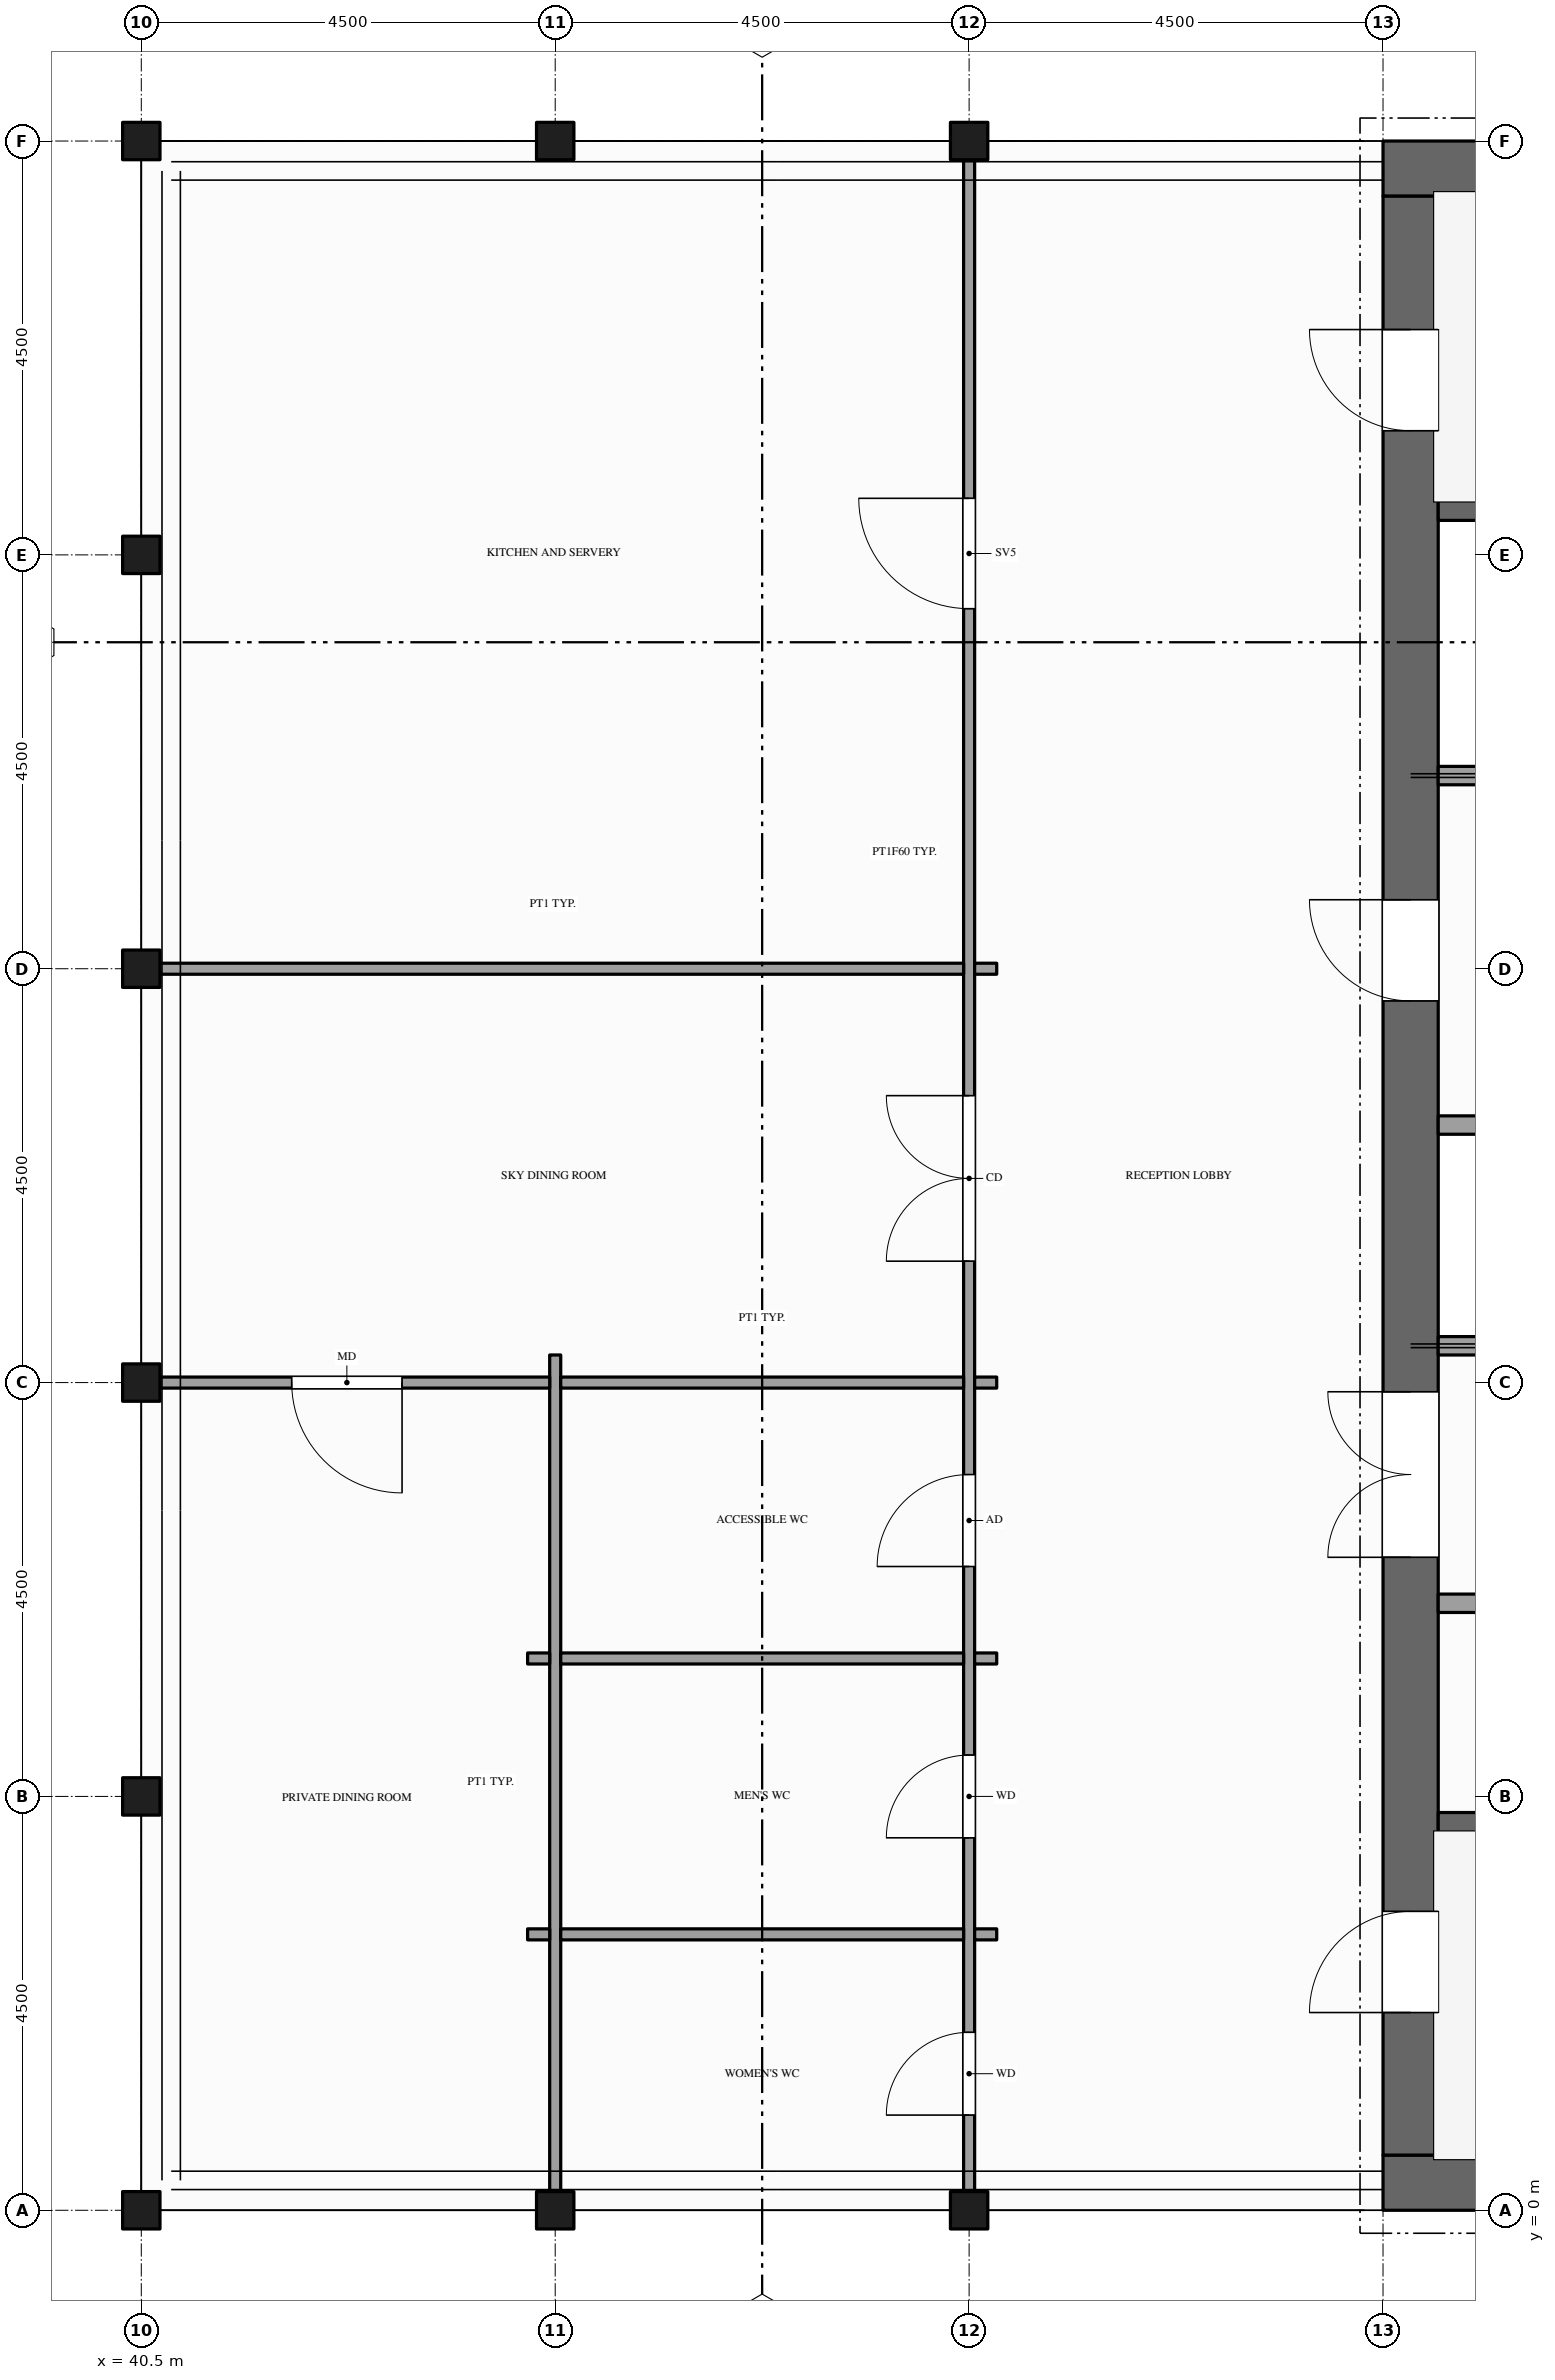
"""IFC4 building model, lengths in metres.
Left out: names, types, materials, properties, quantities, classifications, styles, units other than length and angle.
Written with IfcOpenShell. Run it as: python <this file> out.ifc"""

import sys

from ifc_helpers import new_model, si_unit, direction, frame, frame_2d, origin, place, context, subcontext, project, spatial, rectangle, extrude, element, fill, save


model = new_model("IFC4")
c1 = context("Model", 3, precision=1e-05, world=origin(), true_north=direction((0.0, 1.0)))
c2 = subcontext(c1, "Body", "Model", "MODEL_VIEW")
j1 = project(units=[si_unit("LENGTHUNIT", "METRE"), si_unit("PLANEANGLEUNIT", "RADIAN")], contexts=[c1])
p1 = place(None, origin())
s1 = spatial("IfcSite", under=j1, at=p1, CompositionType="ELEMENT")
p2 = place(p1, origin())
s2 = spatial("IfcBuilding", under=s1, at=p2, CompositionType="ELEMENT")
p3 = place(p2, frame((0.0, 0.0, 350.5)))
s3 = spatial("IfcBuildingStorey", under=s2, at=p3, CompositionType="ELEMENT", Elevation=350.5)
for number, where, z_axis, x_axis in (
    (1, (67.5, 0.3, -0.15), (0.0, 0.0, 1.0), (-1.0, 0.0, 0.0)),
    (2, (54.0, 22.2, -0.15), (0.0, 0.0, 1.0), (1.0, 0.0, 0.0)),
):
    element("IfcWall", number, at=place(p3, frame(where, z_axis=z_axis, x_axis=x_axis)), inside=s3, PredefinedType="SHEAR", context=c2, shape_type="SweptSolid", body=[
        extrude(rectangle(XDim=13.5, YDim=0.6, at=frame_2d((6.75, 0.0))), origin(), (0.0, 0.0, 1.0), 5.0),
    ])
p4 = place(p3, frame((54.3, 0.6, -0.15), z_axis=(0.0, 0.0, 1.0), x_axis=(0.0, 1.0, 0.0)))
e3 = element("IfcWall", 3, at=p4, inside=s3, PredefinedType="SHEAR", context=c2, shape_type="SweptSolid", body=[
    extrude(rectangle(XDim=21.3, YDim=0.6, at=frame_2d((10.65, 0.0))), origin(), (0.0, 0.0, 1.0), 5.0),
])
p5 = place(p4, frame((6.5, 0.0, 0.15)))
e4 = element("IfcOpeningElement", 4, at=p5, cuts=e3, PredefinedType="OPENING", context=c2, shape_type="SweptSolid", body=[
    extrude(rectangle(XDim=1.8, YDim=2.1, at=frame_2d((0.9, 1.05))), frame((0.0, 0.31, 0.0), z_axis=(0.0, -1.0, 0.0), x_axis=(1.0, 0.0, 0.0)), (0.0, 0.0, 1.0), 0.62),
])
p6 = place(p4, frame((12.55, 0.0, 0.15)))
e5 = element("IfcOpeningElement", 5, at=p6, cuts=e3, PredefinedType="OPENING", context=c2, shape_type="SweptSolid", body=[
    extrude(rectangle(XDim=1.1, YDim=2.1, at=frame_2d((0.55, 1.05))), frame((0.0, 0.31, 0.0), z_axis=(0.0, -1.0, 0.0), x_axis=(1.0, 0.0, 0.0)), (0.0, 0.0, 1.0), 0.62),
])
p7 = place(p4, frame((1.55, 0.0, 0.15)))
e6 = element("IfcOpeningElement", 6, at=p7, cuts=e3, PredefinedType="OPENING", context=c2, shape_type="SweptSolid", body=[
    extrude(rectangle(XDim=1.1, YDim=2.1, at=frame_2d((0.55, 1.05))), frame((0.0, 0.31, 0.0), z_axis=(0.0, -1.0, 0.0), x_axis=(1.0, 0.0, 0.0)), (0.0, 0.0, 1.0), 0.62),
])
p8 = place(p4, frame((18.75, 0.0, 0.15)))
e7 = element("IfcOpeningElement", 7, at=p8, cuts=e3, PredefinedType="OPENING", context=c2, shape_type="SweptSolid", body=[
    extrude(rectangle(XDim=1.1, YDim=2.1, at=frame_2d((0.55, 1.05))), frame((0.0, 0.31, 0.0), z_axis=(0.0, -1.0, 0.0), x_axis=(1.0, 0.0, 0.0)), (0.0, 0.0, 1.0), 0.62),
])
p9 = place(p3, frame((45.0, 0.01, 0.0), z_axis=(0.0, 0.0, 1.0), x_axis=(0.0, 1.0, 0.0)))
e8 = element("IfcWall", 8, at=p9, inside=s3, PredefinedType="PARTITIONING", context=c2, shape_type="SweptSolid", body=[
    extrude(rectangle(XDim=9.29, YDim=0.12, at=frame_2d((4.645, 0.0))), origin(), (0.0, 0.0, 1.0), 3.759),
])
p10 = place(p3, frame((49.5, 0.01, 0.0), z_axis=(0.0, 0.0, 1.0), x_axis=(0.0, 1.0, 0.0)))
e9 = element("IfcWall", 9, at=p10, inside=s3, PredefinedType="PARTITIONING", context=c2, shape_type="SweptSolid", body=[
    extrude(rectangle(XDim=22.48, YDim=0.12, at=frame_2d((11.24, 0.0))), origin(), (0.0, 0.0, 1.0), 3.759),
])
p11 = place(p10, frame((1.025, 0.0, 0.0)))
e10 = element("IfcOpeningElement", 10, at=p11, cuts=e9, PredefinedType="OPENING", context=c2, shape_type="SweptSolid", body=[
    extrude(rectangle(XDim=0.9, YDim=2.1, at=frame_2d((0.45, 1.05))), frame((0.0, 0.07, 0.0), z_axis=(0.0, -1.0, 0.0), x_axis=(1.0, 0.0, 0.0)), (0.0, 0.0, 1.0), 0.14),
])
p12 = place(p10, frame((4.04, 0.0, 0.0)))
e11 = element("IfcOpeningElement", 11, at=p12, cuts=e9, PredefinedType="OPENING", context=c2, shape_type="SweptSolid", body=[
    extrude(rectangle(XDim=0.9, YDim=2.1, at=frame_2d((0.45, 1.05))), frame((0.0, 0.07, 0.0), z_axis=(0.0, -1.0, 0.0), x_axis=(1.0, 0.0, 0.0)), (0.0, 0.0, 1.0), 0.14),
])
p13 = place(p10, frame((6.99, 0.0, 0.0)))
e12 = element("IfcOpeningElement", 12, at=p13, cuts=e9, PredefinedType="OPENING", context=c2, shape_type="SweptSolid", body=[
    extrude(rectangle(XDim=1.0, YDim=2.1, at=frame_2d((0.5, 1.05))), frame((0.0, 0.07, 0.0), z_axis=(0.0, -1.0, 0.0), x_axis=(1.0, 0.0, 0.0)), (0.0, 0.0, 1.0), 0.14),
])
p14 = place(p10, frame((10.31, 0.0, 0.0)))
e13 = element("IfcOpeningElement", 13, at=p14, cuts=e9, PredefinedType="OPENING", context=c2, shape_type="SweptSolid", body=[
    extrude(rectangle(XDim=1.8, YDim=2.1, at=frame_2d((0.9, 1.05))), frame((0.0, 0.07, 0.0), z_axis=(0.0, -1.0, 0.0), x_axis=(1.0, 0.0, 0.0)), (0.0, 0.0, 1.0), 0.14),
])
p15 = place(p10, frame((17.405, 0.0, 0.0)))
e14 = element("IfcOpeningElement", 14, at=p15, cuts=e9, PredefinedType="OPENING", context=c2, shape_type="SweptSolid", body=[
    extrude(rectangle(XDim=1.2, YDim=2.1, at=frame_2d((0.6, 1.05))), frame((0.0, 0.07, 0.0), z_axis=(0.0, -1.0, 0.0), x_axis=(1.0, 0.0, 0.0)), (0.0, 0.0, 1.0), 0.14),
])
p16 = place(p3, frame((44.7, 3.0, 0.0), z_axis=(0.0, 0.0, 1.0), x_axis=(1.0, 0.0, 0.0)))
e15 = element("IfcWall", 15, at=p16, inside=s3, PredefinedType="PARTITIONING", context=c2, shape_type="SweptSolid", body=[
    extrude(rectangle(XDim=0.24, YDim=0.12, at=frame_2d((0.12, 0.0))), origin(), (0.0, 0.0, 1.0), 3.759),
])
p17 = place(p3, frame((45.06, 3.0, 0.0), z_axis=(0.0, 0.0, 1.0), x_axis=(1.0, 0.0, 0.0)))
e16 = element("IfcWall", 16, at=p17, inside=s3, PredefinedType="PARTITIONING", context=c2, shape_type="SweptSolid", body=[
    extrude(rectangle(XDim=4.38, YDim=0.12, at=frame_2d((2.19, 0.0))), origin(), (0.0, 0.0, 1.0), 3.759),
])
p18 = place(p3, frame((49.56, 3.0, 0.0), z_axis=(0.0, 0.0, 1.0), x_axis=(1.0, 0.0, 0.0)))
e17 = element("IfcWall", 17, at=p18, inside=s3, PredefinedType="PARTITIONING", context=c2, shape_type="SweptSolid", body=[
    extrude(rectangle(XDim=0.24, YDim=0.12, at=frame_2d((0.12, 0.0))), origin(), (0.0, 0.0, 1.0), 3.759),
])
p19 = place(p3, frame((54.6, 4.2, 0.0), z_axis=(0.0, 0.0, 1.0), x_axis=(1.0, 0.0, 0.0)))
e18 = element("IfcWall", 18, at=p19, inside=s3, PredefinedType="SHEAR", context=c2, shape_type="SweptSolid", body=[
    extrude(rectangle(XDim=6.675, YDim=0.25, at=frame_2d((3.337, 0.0))), origin(), (0.0, 0.0, 1.0), 4.75),
])
p20 = place(p3, frame((44.7, 6.0, 0.0), z_axis=(0.0, 0.0, 1.0), x_axis=(1.0, 0.0, 0.0)))
e19 = element("IfcWall", 19, at=p20, inside=s3, PredefinedType="PARTITIONING", context=c2, shape_type="SweptSolid", body=[
    extrude(rectangle(XDim=0.24, YDim=0.12, at=frame_2d((0.12, 0.0))), origin(), (0.0, 0.0, 1.0), 3.759),
])
p21 = place(p3, frame((45.06, 6.0, 0.0), z_axis=(0.0, 0.0, 1.0), x_axis=(1.0, 0.0, 0.0)))
e20 = element("IfcWall", 20, at=p21, inside=s3, PredefinedType="PARTITIONING", context=c2, shape_type="SweptSolid", body=[
    extrude(rectangle(XDim=4.38, YDim=0.12, at=frame_2d((2.19, 0.0))), origin(), (0.0, 0.0, 1.0), 3.759),
])
p22 = place(p3, frame((49.56, 6.0, 0.0), z_axis=(0.0, 0.0, 1.0), x_axis=(1.0, 0.0, 0.0)))
e21 = element("IfcWall", 21, at=p22, inside=s3, PredefinedType="PARTITIONING", context=c2, shape_type="SweptSolid", body=[
    extrude(rectangle(XDim=0.24, YDim=0.12, at=frame_2d((0.12, 0.0))), origin(), (0.0, 0.0, 1.0), 3.759),
])
p23 = place(p3, frame((54.6, 6.6, 0.0), z_axis=(0.0, 0.0, 1.0), x_axis=(1.0, 0.0, 0.0)))
e22 = element("IfcWall", 22, at=p23, inside=s3, PredefinedType="PARTITIONING", context=c2, shape_type="SweptSolid", body=[
    extrude(rectangle(XDim=7.1, YDim=0.2, at=frame_2d((3.55, 0.0))), origin(), (0.0, 0.0, 1.0), 4.75),
])
p24 = place(p23, frame((3.1, 0.0, 0.0)))
e23 = element("IfcOpeningElement", 23, at=p24, cuts=e22, PredefinedType="OPENING", context=c2, shape_type="SweptSolid", body=[
    extrude(rectangle(XDim=0.9, YDim=2.1, at=frame_2d((0.45, 1.05))), frame((0.0, 0.11, 0.0), z_axis=(0.0, -1.0, 0.0), x_axis=(1.0, 0.0, 0.0)), (0.0, 0.0, 1.0), 0.22),
])
p25 = place(p3, frame((40.51, 9.0, 0.0), z_axis=(0.0, 0.0, 1.0), x_axis=(1.0, 0.0, 0.0)))
e24 = element("IfcWall", 24, at=p25, inside=s3, PredefinedType="PARTITIONING", context=c2, shape_type="SweptSolid", body=[
    extrude(rectangle(XDim=4.43, YDim=0.12, at=frame_2d((2.215, 0.0))), origin(), (0.0, 0.0, 1.0), 3.759),
])
p26 = place(p25, frame((1.625, 0.0, 0.0)))
e25 = element("IfcOpeningElement", 25, at=p26, cuts=e24, PredefinedType="OPENING", context=c2, shape_type="SweptSolid", body=[
    extrude(rectangle(XDim=1.2, YDim=2.1, at=frame_2d((0.6, 1.05))), frame((0.0, 0.07, 0.0), z_axis=(0.0, -1.0, 0.0), x_axis=(1.0, 0.0, 0.0)), (0.0, 0.0, 1.0), 0.14),
])
p27 = place(p3, frame((45.06, 9.0, 0.0), z_axis=(0.0, 0.0, 1.0), x_axis=(1.0, 0.0, 0.0)))
e26 = element("IfcWall", 26, at=p27, inside=s3, PredefinedType="PARTITIONING", context=c2, shape_type="SweptSolid", body=[
    extrude(rectangle(XDim=4.38, YDim=0.12, at=frame_2d((2.19, 0.0))), origin(), (0.0, 0.0, 1.0), 3.759),
])
p28 = place(p3, frame((49.56, 9.0, 0.0), z_axis=(0.0, 0.0, 1.0), x_axis=(1.0, 0.0, 0.0)))
e27 = element("IfcWall", 27, at=p28, inside=s3, PredefinedType="PARTITIONING", context=c2, shape_type="SweptSolid", body=[
    extrude(rectangle(XDim=0.24, YDim=0.12, at=frame_2d((0.12, 0.0))), origin(), (0.0, 0.0, 1.0), 3.759),
])
p29 = place(p3, frame((54.6, 9.4, 0.0), z_axis=(0.0, 0.0, 1.0), x_axis=(1.0, 0.0, 0.0)))
e28 = element("IfcWall", 28, at=p29, inside=s3, PredefinedType="SOLIDWALL", context=c2, shape_type="SweptSolid", body=[
    extrude(rectangle(XDim=2.7, YDim=0.2, at=frame_2d((1.35, 0.0))), origin(), (0.0, 0.0, 1.0), 4.75),
])
p30 = place(p29, frame((0.8, 0.0, 0.012)))
e29 = element("IfcOpeningElement", 29, at=p30, cuts=e28, PredefinedType="OPENING", context=c2, shape_type="SweptSolid", body=[
    extrude(rectangle(XDim=1.1, YDim=2.1, at=frame_2d((0.55, 1.05))), frame((0.0, 0.11, 0.0), z_axis=(0.0, -1.0, 0.0), x_axis=(1.0, 0.0, 0.0)), (0.0, 0.0, 1.0), 0.22),
])
p31 = place(p3, frame((54.6, 11.8, 0.0), z_axis=(0.0, 0.0, 1.0), x_axis=(1.0, 0.0, 0.0)))
e30 = element("IfcWall", 30, at=p31, inside=s3, PredefinedType="SOLIDWALL", context=c2, shape_type="SweptSolid", body=[
    extrude(rectangle(XDim=2.7, YDim=0.2, at=frame_2d((1.35, 0.0))), origin(), (0.0, 0.0, 1.0), 4.75),
])
p32 = place(p3, frame((40.51, 13.5, 0.0), z_axis=(0.0, 0.0, 1.0), x_axis=(1.0, 0.0, 0.0)))
e31 = element("IfcWall", 31, at=p32, inside=s3, PredefinedType="PARTITIONING", context=c2, shape_type="SweptSolid", body=[
    extrude(rectangle(XDim=8.93, YDim=0.12, at=frame_2d((4.465, 0.0))), origin(), (0.0, 0.0, 1.0), 3.759),
])
p33 = place(p3, frame((49.56, 13.5, 0.0), z_axis=(0.0, 0.0, 1.0), x_axis=(1.0, 0.0, 0.0)))
e32 = element("IfcWall", 32, at=p33, inside=s3, PredefinedType="PARTITIONING", context=c2, shape_type="SweptSolid", body=[
    extrude(rectangle(XDim=0.24, YDim=0.12, at=frame_2d((0.12, 0.0))), origin(), (0.0, 0.0, 1.0), 3.759),
])
p34 = place(p3, frame((54.6, 15.6, 0.0), z_axis=(0.0, 0.0, 1.0), x_axis=(1.0, 0.0, 0.0)))
e33 = element("IfcWall", 33, at=p34, inside=s3, PredefinedType="SOLIDWALL", context=c2, shape_type="SweptSolid", body=[
    extrude(rectangle(XDim=2.7, YDim=0.2, at=frame_2d((1.35, 0.0))), origin(), (0.0, 0.0, 1.0), 4.75),
])
p35 = place(p34, frame((0.8, 0.0, 0.012)))
e34 = element("IfcOpeningElement", 34, at=p35, cuts=e33, PredefinedType="OPENING", context=c2, shape_type="SweptSolid", body=[
    extrude(rectangle(XDim=1.1, YDim=2.1, at=frame_2d((0.55, 1.05))), frame((0.0, 0.11, 0.0), z_axis=(0.0, -1.0, 0.0), x_axis=(1.0, 0.0, 0.0)), (0.0, 0.0, 1.0), 0.22),
])
p36 = place(p3, frame((54.6, 18.5, 0.0), z_axis=(0.0, 0.0, 1.0), x_axis=(1.0, 0.0, 0.0)))
e35 = element("IfcWall", 35, at=p36, inside=s3, PredefinedType="SHEAR", context=c2, shape_type="SweptSolid", body=[
    extrude(rectangle(XDim=6.675, YDim=0.25, at=frame_2d((3.337, 0.0))), origin(), (0.0, 0.0, 1.0), 4.75),
])
p37 = place(p5, origin())
e36 = element("IfcDoor", 36, at=p37, inside=s3, OperationType="DOUBLE_DOOR_SINGLE_SWING", PredefinedType="DOOR", context=c2, shape_type="SweptSolid", body=[
    extrude(rectangle(XDim=1.8, YDim=2.1, at=frame_2d((0.9, 1.05))), frame((0.0, 0.025, 0.0), z_axis=(0.0, -1.0, 0.0), x_axis=(1.0, 0.0, 0.0)), (0.0, 0.0, 1.0), 0.05),
])
fill(e4, e36)
p38 = place(p6, origin())
e37 = element("IfcDoor", 37, at=p38, inside=s3, OperationType="SINGLE_SWING_RIGHT", PredefinedType="DOOR", context=c2, shape_type="SweptSolid", body=[
    extrude(rectangle(XDim=1.1, YDim=2.1, at=frame_2d((0.55, 1.05))), frame((0.0, 0.025, 0.0), z_axis=(0.0, -1.0, 0.0), x_axis=(1.0, 0.0, 0.0)), (0.0, 0.0, 1.0), 0.05),
])
fill(e5, e37)
p39 = place(p7, origin())
e38 = element("IfcDoor", 38, at=p39, inside=s3, OperationType="SINGLE_SWING_LEFT", PredefinedType="DOOR", context=c2, shape_type="SweptSolid", body=[
    extrude(rectangle(XDim=1.1, YDim=2.1, at=frame_2d((0.55, 1.05))), frame((0.0, 0.025, 0.0), z_axis=(0.0, -1.0, 0.0), x_axis=(1.0, 0.0, 0.0)), (0.0, 0.0, 1.0), 0.05),
])
fill(e6, e38)
p40 = place(p8, origin())
e39 = element("IfcDoor", 39, at=p40, inside=s3, OperationType="SINGLE_SWING_RIGHT", PredefinedType="DOOR", context=c2, shape_type="SweptSolid", body=[
    extrude(rectangle(XDim=1.1, YDim=2.1, at=frame_2d((0.55, 1.05))), frame((0.0, 0.025, 0.0), z_axis=(0.0, -1.0, 0.0), x_axis=(1.0, 0.0, 0.0)), (0.0, 0.0, 1.0), 0.05),
])
fill(e7, e39)
p41 = place(p11, origin())
e40 = element("IfcDoor", 40, at=p41, inside=s3, OperationType="SINGLE_SWING_LEFT", PredefinedType="DOOR", context=c2, shape_type="SweptSolid", body=[
    extrude(rectangle(XDim=0.9, YDim=2.1, at=frame_2d((0.45, 1.05))), frame((0.0, 0.025, 0.0), z_axis=(0.0, -1.0, 0.0), x_axis=(1.0, 0.0, 0.0)), (0.0, 0.0, 1.0), 0.05),
])
fill(e10, e40)
p42 = place(p12, origin())
e41 = element("IfcDoor", 41, at=p42, inside=s3, OperationType="SINGLE_SWING_LEFT", PredefinedType="DOOR", context=c2, shape_type="SweptSolid", body=[
    extrude(rectangle(XDim=0.9, YDim=2.1, at=frame_2d((0.45, 1.05))), frame((0.0, 0.025, 0.0), z_axis=(0.0, -1.0, 0.0), x_axis=(1.0, 0.0, 0.0)), (0.0, 0.0, 1.0), 0.05),
])
fill(e11, e41)
p43 = place(p13, origin())
e42 = element("IfcDoor", 42, at=p43, inside=s3, OperationType="SINGLE_SWING_LEFT", PredefinedType="DOOR", context=c2, shape_type="SweptSolid", body=[
    extrude(rectangle(XDim=1.0, YDim=2.1, at=frame_2d((0.5, 1.05))), frame((0.0, 0.025, 0.0), z_axis=(0.0, -1.0, 0.0), x_axis=(1.0, 0.0, 0.0)), (0.0, 0.0, 1.0), 0.05),
])
fill(e12, e42)
p44 = place(p14, origin())
e43 = element("IfcDoor", 43, at=p44, inside=s3, OperationType="DOUBLE_DOOR_SINGLE_SWING", PredefinedType="DOOR", context=c2, shape_type="SweptSolid", body=[
    extrude(rectangle(XDim=1.8, YDim=2.1, at=frame_2d((0.9, 1.05))), frame((0.0, 0.025, 0.0), z_axis=(0.0, -1.0, 0.0), x_axis=(1.0, 0.0, 0.0)), (0.0, 0.0, 1.0), 0.05),
])
fill(e13, e43)
p45 = place(p26, origin())
e44 = element("IfcDoor", 44, at=p45, inside=s3, OperationType="SINGLE_SWING_RIGHT", PredefinedType="DOOR", context=c2, shape_type="SweptSolid", body=[
    extrude(rectangle(XDim=1.2, YDim=2.1, at=frame_2d((0.6, 1.05))), frame((0.0, 0.025, 0.0), z_axis=(0.0, -1.0, 0.0), x_axis=(1.0, 0.0, 0.0)), (0.0, 0.0, 1.0), 0.05),
])
fill(e25, e44)
p46 = place(p15, origin())
e45 = element("IfcDoor", 45, at=p46, inside=s3, OperationType="SINGLE_SWING_RIGHT", PredefinedType="DOOR", context=c2, shape_type="SweptSolid", body=[
    extrude(rectangle(XDim=1.2, YDim=2.1, at=frame_2d((0.6, 1.05))), frame((0.0, 0.025, 0.0), z_axis=(0.0, -1.0, 0.0), x_axis=(1.0, 0.0, 0.0)), (0.0, 0.0, 1.0), 0.05),
])
fill(e14, e45)
save(model, sys.argv[1])
